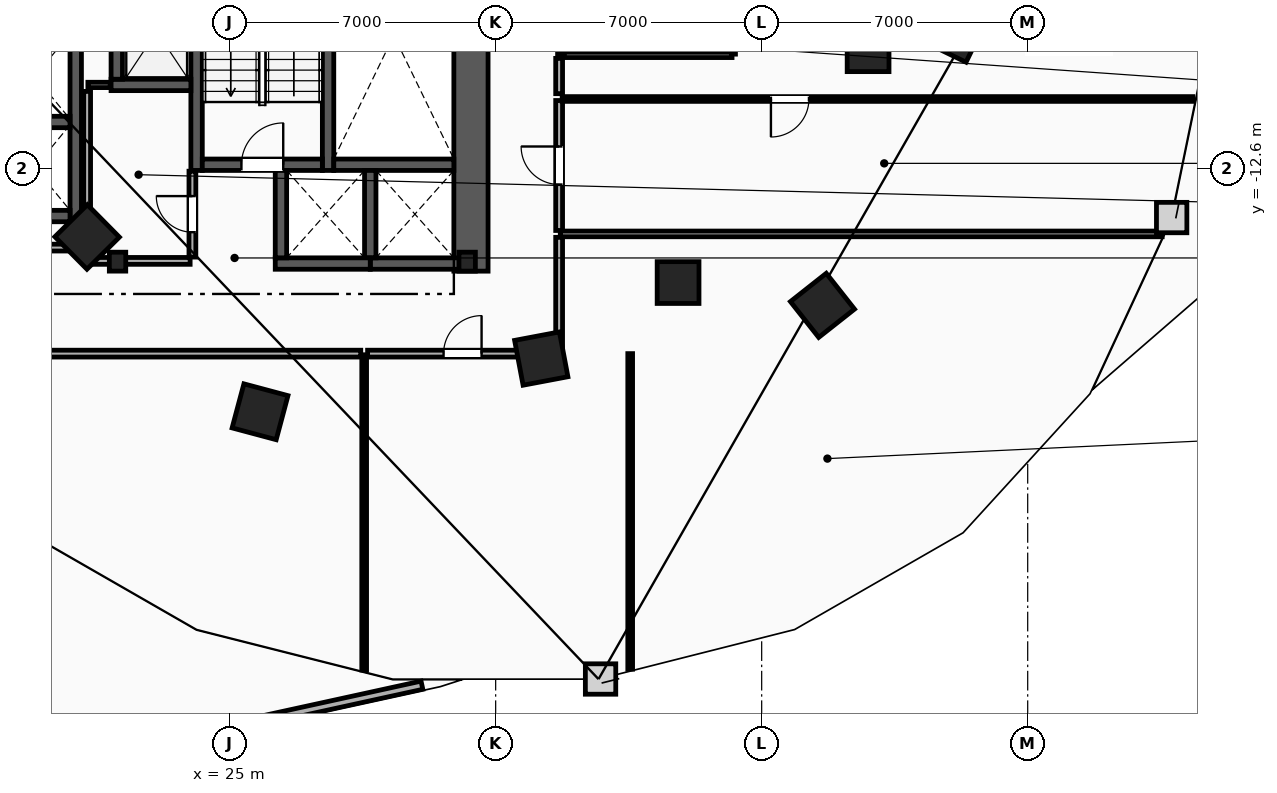
"""IFC4 building model, lengths in metres.
Left out: names, types, materials, properties, quantities, classifications, styles, units other than length and angle.
Written with IfcOpenShell. Run it as: python <this file> out.ifc"""

import sys

from ifc_helpers import new_model, si_unit, direction, frame, frame_2d, origin, origin_2d, place, context, subcontext, project, spatial, rectangle, i_section, extrude, element, fill, save


model = new_model("IFC4")
c1 = context("Model", 3, precision=1e-05, world=origin(), true_north=direction((0.0, 1.0)))
c2 = subcontext(c1, "Body", "Model", "MODEL_VIEW")
j1 = project(units=[si_unit("LENGTHUNIT", "METRE"), si_unit("PLANEANGLEUNIT", "RADIAN")], contexts=[c1])
p1 = place(None, origin())
s1 = spatial("IfcSite", under=j1, at=p1, CompositionType="ELEMENT")
p2 = place(p1, origin())
s2 = spatial("IfcBuilding", under=s1, at=p2, CompositionType="ELEMENT")
p3 = place(p2, frame((0.0, 0.0, 24.0)))
s3 = spatial("IfcBuildingStorey", under=s2, at=p3, CompositionType="ELEMENT", Elevation=24.0)
for number, where, z_axis, x_axis in (
    (1, (22.05, -15.05, 0.0), (0.0, 0.0, 1.0), (1.0, 0.0, 0.0)),
    (2, (31.25, -15.05, 0.0), (0.0, 0.0, 1.0), (1.0, 0.0, 0.0)),
):
    element("IfcColumn", number, at=place(p3, frame(where, z_axis=z_axis, x_axis=x_axis)), inside=s3, PredefinedType="COLUMN", context=c2, shape_type="SweptSolid", body=[
        extrude(i_section(OverallWidth=0.432, OverallDepth=0.498, WebThickness=0.056, FlangeThickness=0.089, FilletRadius=0.018, at=origin_2d()), origin(), (0.0, 0.0, 1.0), 3.8),
    ])
for number, where, z_axis, x_axis in (
    (3, (41.8, -9.5, 0.0), (0.0, 0.0, 1.0), (1.0, 0.0, 0.0)),
    (4, (36.8, -15.6, 0.0), (0.0, 0.0, 1.0), (1.0, 0.0, 0.0)),
):
    element("IfcColumn", number, at=place(p3, frame(where, z_axis=z_axis, x_axis=x_axis)), inside=s3, PredefinedType="COLUMN", context=c2, shape_type="SweptSolid", body=[
        extrude(rectangle(XDim=1.1, YDim=1.1, at=origin_2d()), origin(), (0.0, 0.0, 1.0), 3.8),
    ])
for number, where, z_axis, x_axis in (
    (5, (21.25, -14.4, 0.0), (0.0, 0.0, 1.0), (0.703, -0.711, 0.0)),
    (6, (25.8, -19.0, 0.0), (0.0, 0.0, 1.0), (0.966, -0.259, 0.0)),
    (7, (33.2, -17.6, 0.0), (0.0, 0.0, 1.0), (0.983, 0.186, 0.0)),
    (8, (40.6, -16.2, 0.0), (0.0, 0.0, 1.0), (0.785, 0.619, 0.0)),
    (9, (44.1, -9.0, 0.0), (0.0, 0.0, 1.0), (0.437, 0.899, 0.0)),
):
    element("IfcColumn", number, at=place(p3, frame(where, z_axis=z_axis, x_axis=x_axis)), inside=s3, PredefinedType="COLUMN", context=c2, shape_type="SweptSolid", body=[
        extrude(rectangle(XDim=1.2, YDim=1.2, at=origin_2d()), origin(), (0.0, 0.0, 1.0), 3.8),
    ])
p4 = place(p3, frame((30.06, -26.195, 0.0), z_axis=(0.0, 0.0, 1.0), x_axis=(-0.976903447966, -0.213681195598, 0.0)))
e10 = element("IfcWall", 10, at=p4, inside=s3, PredefinedType="PARAPET", context=c2, shape_type="SweptSolid", body=[
    extrude(rectangle(XDim=6.964, YDim=0.22, at=frame_2d((3.482, 0.0))), origin(), (0.0, 0.0, 1.0), 1.15),
])
p5 = place(p3, frame((31.35, -15.3, 0.0), z_axis=(0.0, 0.0, 1.0), x_axis=(0.0, 1.0, 0.0)))
e11 = element("IfcWall", 11, at=p5, inside=s3, PredefinedType="SHEAR", context=c2, shape_type="SweptSolid", body=[
    extrude(rectangle(XDim=13.33, YDim=0.9, at=frame_2d((6.665, 0.0))), origin(), (0.0, 0.0, 1.0), 3.5),
])
for number, where, z_axis, x_axis in (
    (12, (27.59, -12.65, 0.0), (0.0, 0.0, 1.0), (0.0, 1.0, 0.0)),
    (13, (24.13, -12.65, 0.0), (0.0, 0.0, 1.0), (0.0, 1.0, 0.0)),
):
    element("IfcWall", number, at=place(p3, frame(where, z_axis=z_axis, x_axis=x_axis)), inside=s3, PredefinedType="SHEAR", context=c2, shape_type="SweptSolid", body=[
        extrude(rectangle(XDim=10.68, YDim=0.3, at=frame_2d((5.34, 0.0))), origin(), (0.0, 0.0, 1.0), 3.5),
    ])
p6 = place(p3, frame((27.74, -12.5, 0.0), z_axis=(0.0, 0.0, 1.0), x_axis=(1.0, 0.0, 0.0)))
e14 = element("IfcWall", 14, at=p6, inside=s3, PredefinedType="SHEAR", context=c2, shape_type="SweptSolid", body=[
    extrude(rectangle(XDim=3.16, YDim=0.3, at=frame_2d((1.58, 0.0))), origin(), (0.0, 0.0, 1.0), 3.5),
])
p7 = place(p3, frame((24.28, -12.5, 0.0), z_axis=(0.0, 0.0, 1.0), x_axis=(1.0, 0.0, 0.0)))
e15 = element("IfcWall", 15, at=p7, inside=s3, PredefinedType="SHEAR", context=c2, shape_type="SweptSolid", body=[
    extrude(rectangle(XDim=3.16, YDim=0.3, at=frame_2d((1.58, 0.0))), origin(), (0.0, 0.0, 1.0), 3.5),
])
p8 = place(p7, frame((1.03, 0.0, 0.0)))
e16 = element("IfcOpeningElement", 16, at=p8, cuts=e15, PredefinedType="OPENING", context=c2, shape_type="SweptSolid", body=[
    extrude(rectangle(XDim=1.1, YDim=2.15, at=frame_2d((0.55, 1.075))), frame((0.0, 0.16, 0.0), z_axis=(0.0, -1.0, 0.0), x_axis=(1.0, 0.0, 0.0)), (0.0, 0.0, 1.0), 0.32),
])
p9 = place(p3, frame((21.88, -10.4, 0.0), z_axis=(0.0, 0.0, 1.0), x_axis=(1.0, 0.0, 0.0)))
e17 = element("IfcWall", 17, at=p9, inside=s3, PredefinedType="SHEAR", context=c2, shape_type="SweptSolid", body=[
    extrude(rectangle(XDim=2.1, YDim=0.3, at=frame_2d((1.05, 0.0))), origin(), (0.0, 0.0, 1.0), 3.5),
])
for number, where, z_axis, x_axis in (
    (18, (22.03, -10.25, 0.0), (0.0, 0.0, 1.0), (0.0, 1.0, 0.0)),
    (19, (28.7, -15.1, 0.0), (0.0, 0.0, 1.0), (1.0, 0.0, 0.0)),
):
    element("IfcWall", number, at=place(p3, frame(where, z_axis=z_axis, x_axis=x_axis)), inside=s3, PredefinedType="SHEAR", context=c2, shape_type="SweptSolid", body=[
        extrude(rectangle(XDim=2.5, YDim=0.3, at=frame_2d((1.25, 0.0))), origin(), (0.0, 0.0, 1.0), 3.5),
    ])
p10 = place(p3, frame((28.7, -14.95, 0.0), z_axis=(0.0, 0.0, 1.0), x_axis=(0.0, 1.0, 0.0)))
e20 = element("IfcWall", 20, at=p10, inside=s3, PredefinedType="SHEAR", context=c2, shape_type="SweptSolid", body=[
    extrude(rectangle(XDim=2.3, YDim=0.3, at=frame_2d((1.15, 0.0))), origin(), (0.0, 0.0, 1.0), 3.5),
])
p11 = place(p3, frame((26.2, -15.1, 0.0), z_axis=(0.0, 0.0, 1.0), x_axis=(1.0, 0.0, 0.0)))
e21 = element("IfcWall", 21, at=p11, inside=s3, PredefinedType="SHEAR", context=c2, shape_type="SweptSolid", body=[
    extrude(rectangle(XDim=2.5, YDim=0.3, at=frame_2d((1.25, 0.0))), origin(), (0.0, 0.0, 1.0), 3.5),
])
p12 = place(p3, frame((26.35, -14.95, 0.0), z_axis=(0.0, 0.0, 1.0), x_axis=(0.0, 1.0, 0.0)))
e22 = element("IfcWall", 22, at=p12, inside=s3, PredefinedType="SHEAR", context=c2, shape_type="SweptSolid", body=[
    extrude(rectangle(XDim=2.3, YDim=0.3, at=frame_2d((1.15, 0.0))), origin(), (0.0, 0.0, 1.0), 3.5),
])
p13 = place(p3, frame((20.95, -14.0, 0.0), z_axis=(0.0, 0.0, 1.0), x_axis=(0.0, 1.0, 0.0)))
e23 = element("IfcWall", 23, at=p13, inside=s3, PredefinedType="SHEAR", context=c2, shape_type="SweptSolid", body=[
    extrude(rectangle(XDim=10.05, YDim=0.3, at=frame_2d((5.025, 0.0))), origin(), (0.0, 0.0, 1.0), 3.5),
])
for number, where, z_axis, x_axis in (
    (24, (18.95, -13.85, 0.0), (0.0, 0.0, 1.0), (1.0, 0.0, 0.0)),
    (25, (18.95, -11.375, 0.0), (0.0, 0.0, 1.0), (1.0, 0.0, 0.0)),
):
    element("IfcWall", number, at=place(p3, frame(where, z_axis=z_axis, x_axis=x_axis)), inside=s3, PredefinedType="SHEAR", context=c2, shape_type="SweptSolid", body=[
        extrude(rectangle(XDim=1.85, YDim=0.3, at=frame_2d((0.925, 0.0))), origin(), (0.0, 0.0, 1.0), 3.5),
    ])
p14 = place(p3, frame((21.27, -10.4, 0.0), z_axis=(0.0, 0.0, 1.0), x_axis=(1.0, 0.0, 0.0)))
e26 = element("IfcWall", 26, at=p14, inside=s3, PredefinedType="PARTITIONING", context=c2, shape_type="SweptSolid", body=[
    extrude(rectangle(XDim=0.59, YDim=0.14, at=frame_2d((0.295, 0.0))), origin(), (0.0, 0.0, 1.0), 3.5),
])
p15 = place(p3, frame((21.25, -14.93, 0.0), z_axis=(0.0, 0.0, 1.0), x_axis=(0.0, 1.0, 0.0)))
e27 = element("IfcWall", 27, at=p15, inside=s3, PredefinedType="PARTITIONING", context=c2, shape_type="SweptSolid", body=[
    extrude(rectangle(XDim=4.36, YDim=0.18, at=frame_2d((2.18, 0.0))), origin(), (0.0, 0.0, 1.0), 3.5),
])
p16 = place(p3, frame((21.35, -15.03, 0.0), z_axis=(0.0, 0.0, 1.0), x_axis=(1.0, 0.0, 0.0)))
e28 = element("IfcWall", 28, at=p16, inside=s3, PredefinedType="PARTITIONING", context=c2, shape_type="SweptSolid", body=[
    extrude(rectangle(XDim=2.61, YDim=0.18, at=frame_2d((1.305, 0.0))), origin(), (0.0, 0.0, 1.0), 2.573),
])
p17 = place(p3, frame((24.02, -14.93, 0.0), z_axis=(0.0, 0.0, 1.0), x_axis=(0.0, 1.0, 0.0)))
e29 = element("IfcWall", 29, at=p17, inside=s3, PredefinedType="PARTITIONING", context=c2, shape_type="SweptSolid", body=[
    extrude(rectangle(XDim=2.26, YDim=0.18, at=frame_2d((1.13, 0.0))), origin(), (0.0, 0.0, 1.0), 3.5),
])
p18 = place(p17, frame((0.655, 0.0, 0.0)))
e30 = element("IfcOpeningElement", 30, at=p18, cuts=e29, PredefinedType="OPENING", context=c2, shape_type="SweptSolid", body=[
    extrude(rectangle(XDim=0.95, YDim=2.1, at=frame_2d((0.475, 1.05))), frame((0.0, 0.1, 0.0), z_axis=(0.0, -1.0, 0.0), x_axis=(1.0, 0.0, 0.0)), (0.0, 0.0, 1.0), 0.2),
])
p19 = place(p3, frame((38.24, -9.59, 0.0), z_axis=(0.0, 0.0, 1.0), x_axis=(0.0, 1.0, 0.0)))
e31 = element("IfcWall", 31, at=p19, inside=s3, PredefinedType="PARTITIONING", context=c2, shape_type="SweptSolid", body=[
    extrude(rectangle(XDim=2.585, YDim=0.14, at=frame_2d((1.292, 0.0))), origin(), (0.0, 0.0, 1.0), 3.5),
])
p20 = place(p3, frame((33.74, -9.61, 0.0), z_axis=(0.0, 0.0, 1.0), x_axis=(1.0, 0.0, 0.0)))
e32 = element("IfcWall", 32, at=p20, inside=s3, PredefinedType="PARTITIONING", context=c2, shape_type="SweptSolid", body=[
    extrude(rectangle(XDim=4.48, YDim=0.14, at=frame_2d((2.24, 0.0))), origin(), (0.0, 0.0, 1.0), 3.5),
])
p21 = place(p3, frame((33.72, -9.59, 0.0), z_axis=(0.0, 0.0, 1.0), x_axis=(0.0, 1.0, 0.0)))
e33 = element("IfcWall", 33, at=p21, inside=s3, PredefinedType="PARTITIONING", context=c2, shape_type="SweptSolid", body=[
    extrude(rectangle(XDim=4.16, YDim=0.18, at=frame_2d((2.08, 0.0))), origin(), (0.0, 0.0, 1.0), 3.5),
])
p22 = place(p21, frame((1.58, 0.0, 0.0)))
e34 = element("IfcOpeningElement", 34, at=p22, cuts=e33, PredefinedType="OPENING", context=c2, shape_type="SweptSolid", body=[
    extrude(rectangle(XDim=1.0, YDim=2.15, at=frame_2d((0.5, 1.075))), frame((0.0, 0.1, 0.0), z_axis=(0.0, -1.0, 0.0), x_axis=(1.0, 0.0, 0.0)), (0.0, 0.0, 1.0), 0.2),
])
p23 = place(p3, frame((33.7, -14.32, 0.0), z_axis=(0.0, 0.0, 1.0), x_axis=(1.0, 0.0, 0.0)))
e35 = element("IfcWall", 35, at=p23, inside=s3, PredefinedType="PARTITIONING", context=c2, shape_type="SweptSolid", body=[
    extrude(rectangle(XDim=15.838, YDim=0.15, at=frame_2d((7.919, 0.0))), origin(), (0.0, 0.0, 1.0), 3.5),
])
p24 = place(p3, frame((28.54, -25.794, 0.0), z_axis=(0.0, 0.0, 1.0), x_axis=(0.0, 1.0, 0.0)))
e36 = element("IfcWall", 36, at=p24, inside=s3, PredefinedType="PARTITIONING", context=c2, shape_type="SweptSolid", body=[
    extrude(rectangle(XDim=8.294, YDim=0.125, at=frame_2d((4.147, 0.0))), origin(), (0.0, 0.0, 1.0), 3.5),
])
p25 = place(p3, frame((35.54, -25.773, 0.0), z_axis=(0.0, 0.0, 1.0), x_axis=(0.0, 1.0, 0.0)))
e37 = element("IfcWall", 37, at=p25, inside=s3, PredefinedType="PARTITIONING", context=c2, shape_type="SweptSolid", body=[
    extrude(rectangle(XDim=8.303, YDim=0.125, at=frame_2d((4.152, 0.0))), origin(), (0.0, 0.0, 1.0), 3.5),
])
p26 = place(p3, frame((28.63, -17.47, 0.0), z_axis=(0.0, 0.0, 1.0), x_axis=(1.0, 0.0, 0.0)))
e38 = element("IfcWall", 38, at=p26, inside=s3, PredefinedType="PARTITIONING", context=c2, shape_type="SweptSolid", body=[
    extrude(rectangle(XDim=4.999, YDim=0.18, at=frame_2d((2.499, 0.0))), origin(), (0.0, 0.0, 1.0), 3.5),
])
p27 = place(p26, frame((1.999, 0.0, 0.0)))
e39 = element("IfcOpeningElement", 39, at=p27, cuts=e38, PredefinedType="OPENING", context=c2, shape_type="SweptSolid", body=[
    extrude(rectangle(XDim=1.0, YDim=2.15, at=frame_2d((0.5, 1.075))), frame((0.0, 0.1, 0.0), z_axis=(0.0, -1.0, 0.0), x_axis=(1.0, 0.0, 0.0)), (0.0, 0.0, 1.0), 0.2),
])
p28 = place(p3, frame((33.67, -17.428, 0.0), z_axis=(0.0, 0.0, 1.0), x_axis=(0.0, 1.0, 0.0)))
e40 = element("IfcWall", 40, at=p28, inside=s3, PredefinedType="PARTITIONING", context=c2, shape_type="SweptSolid", body=[
    extrude(rectangle(XDim=3.019, YDim=0.18, at=frame_2d((1.509, 0.0))), origin(), (0.0, 0.0, 1.0), 3.5),
])
p29 = place(p3, frame((33.67, -14.23, 0.0), z_axis=(0.0, 0.0, 1.0), x_axis=(0.0, 1.0, 0.0)))
e41 = element("IfcWall", 41, at=p29, inside=s3, PredefinedType="PARTITIONING", context=c2, shape_type="SweptSolid", body=[
    extrude(rectangle(XDim=3.42, YDim=0.18, at=frame_2d((1.71, 0.0))), origin(), (0.0, 0.0, 1.0), 3.5),
])
p30 = place(p29, frame((1.21, 0.0, 0.0)))
e42 = element("IfcOpeningElement", 42, at=p30, cuts=e41, PredefinedType="OPENING", context=c2, shape_type="SweptSolid", body=[
    extrude(rectangle(XDim=1.0, YDim=2.15, at=frame_2d((0.5, 1.075))), frame((0.0, 0.1, 0.0), z_axis=(0.0, -1.0, 0.0), x_axis=(1.0, 0.0, 0.0)), (0.0, 0.0, 1.0), 0.2),
])
p31 = place(p3, frame((33.67, -10.63, 0.0), z_axis=(0.0, 0.0, 1.0), x_axis=(0.0, 1.0, 0.0)))
e43 = element("IfcWall", 43, at=p31, inside=s3, PredefinedType="PARTITIONING", context=c2, shape_type="SweptSolid", body=[
    extrude(rectangle(XDim=0.928, YDim=0.18, at=frame_2d((0.464, 0.0))), origin(), (0.0, 0.0, 1.0), 3.5),
])
p32 = place(p3, frame((16.822, -17.47, 0.0), z_axis=(0.0, 0.0, 1.0), x_axis=(1.0, 0.0, 0.0)))
e44 = element("IfcWall", 44, at=p32, inside=s3, PredefinedType="PARTITIONING", context=c2, shape_type="SweptSolid", body=[
    extrude(rectangle(XDim=11.628, YDim=0.18, at=frame_2d((5.814, 0.0))), origin(), (0.0, 0.0, 1.0), 3.5),
])
p33 = place(p3, frame((21.178, -14.68, 0.0), z_axis=(0.0, 0.0, 1.0), x_axis=(-1.0, 0.0, 0.0)))
e45 = element("IfcWall", 45, at=p33, inside=s3, PredefinedType="PARTITIONING", context=c2, shape_type="SweptSolid", body=[
    extrude(rectangle(XDim=4.357, YDim=0.18, at=frame_2d((2.178, 0.0))), origin(), (0.0, 0.0, 1.0), 3.5),
])
p34 = place(p3, frame((50.343, -10.77, 0.0), z_axis=(0.0, 0.0, 1.0), x_axis=(-1.0, 0.0, 0.0)))
e46 = element("IfcWall", 46, at=p34, inside=s3, PredefinedType="PARTITIONING", context=c2, shape_type="SweptSolid", body=[
    extrude(rectangle(XDim=16.593, YDim=0.125, at=frame_2d((8.296, 0.0))), origin(), (0.0, 0.0, 1.0), 3.5),
])
p35 = place(p34, frame((10.099, 0.0, 0.0)))
e47 = element("IfcOpeningElement", 47, at=p35, cuts=e46, PredefinedType="OPENING", context=c2, shape_type="SweptSolid", body=[
    extrude(rectangle(XDim=1.0, YDim=2.15, at=frame_2d((0.5, 1.075))), frame((0.0, 0.073, 0.0), z_axis=(0.0, -1.0, 0.0), x_axis=(1.0, 0.0, 0.0)), (0.0, 0.0, 1.0), 0.145),
])
p36 = place(p8, origin())
e48 = element("IfcDoor", 48, at=p36, inside=s3, OperationType="SINGLE_SWING_RIGHT", PredefinedType="DOOR", context=c2, shape_type="SweptSolid", body=[
    extrude(rectangle(XDim=1.1, YDim=2.15, at=frame_2d((0.55, 1.075))), frame((0.0, 0.025, 0.0), z_axis=(0.0, -1.0, 0.0), x_axis=(1.0, 0.0, 0.0)), (0.0, 0.0, 1.0), 0.05),
])
fill(e16, e48)
p37 = place(p35, origin())
e49 = element("IfcDoor", 49, at=p37, inside=s3, OperationType="SINGLE_SWING_RIGHT", PredefinedType="DOOR", context=c2, shape_type="SweptSolid", body=[
    extrude(rectangle(XDim=1.0, YDim=2.15, at=frame_2d((0.5, 1.075))), frame((0.0, 0.025, 0.0), z_axis=(0.0, -1.0, 0.0), x_axis=(1.0, 0.0, 0.0)), (0.0, 0.0, 1.0), 0.05),
])
fill(e47, e49)
p38 = place(p27, origin())
e50 = element("IfcDoor", 50, at=p38, inside=s3, OperationType="SINGLE_SWING_RIGHT", PredefinedType="DOOR", context=c2, shape_type="SweptSolid", body=[
    extrude(rectangle(XDim=1.0, YDim=2.15, at=frame_2d((0.5, 1.075))), frame((0.0, 0.025, 0.0), z_axis=(0.0, -1.0, 0.0), x_axis=(1.0, 0.0, 0.0)), (0.0, 0.0, 1.0), 0.05),
])
fill(e39, e50)
p39 = place(p30, origin())
e51 = element("IfcDoor", 51, at=p39, inside=s3, OperationType="SINGLE_SWING_RIGHT", PredefinedType="DOOR", context=c2, shape_type="SweptSolid", body=[
    extrude(rectangle(XDim=1.0, YDim=2.15, at=frame_2d((0.5, 1.075))), frame((0.0, 0.025, 0.0), z_axis=(0.0, -1.0, 0.0), x_axis=(1.0, 0.0, 0.0)), (0.0, 0.0, 1.0), 0.05),
])
fill(e42, e51)
p40 = place(p18, origin())
e52 = element("IfcDoor", 52, at=p40, inside=s3, OperationType="SINGLE_SWING_RIGHT", PredefinedType="DOOR", context=c2, shape_type="SweptSolid", body=[
    extrude(rectangle(XDim=0.95, YDim=2.1, at=frame_2d((0.475, 1.05))), frame((0.0, 0.025, 0.0), z_axis=(0.0, -1.0, 0.0), x_axis=(1.0, 0.0, 0.0)), (0.0, 0.0, 1.0), 0.05),
])
fill(e30, e52)
save(model, sys.argv[1])
